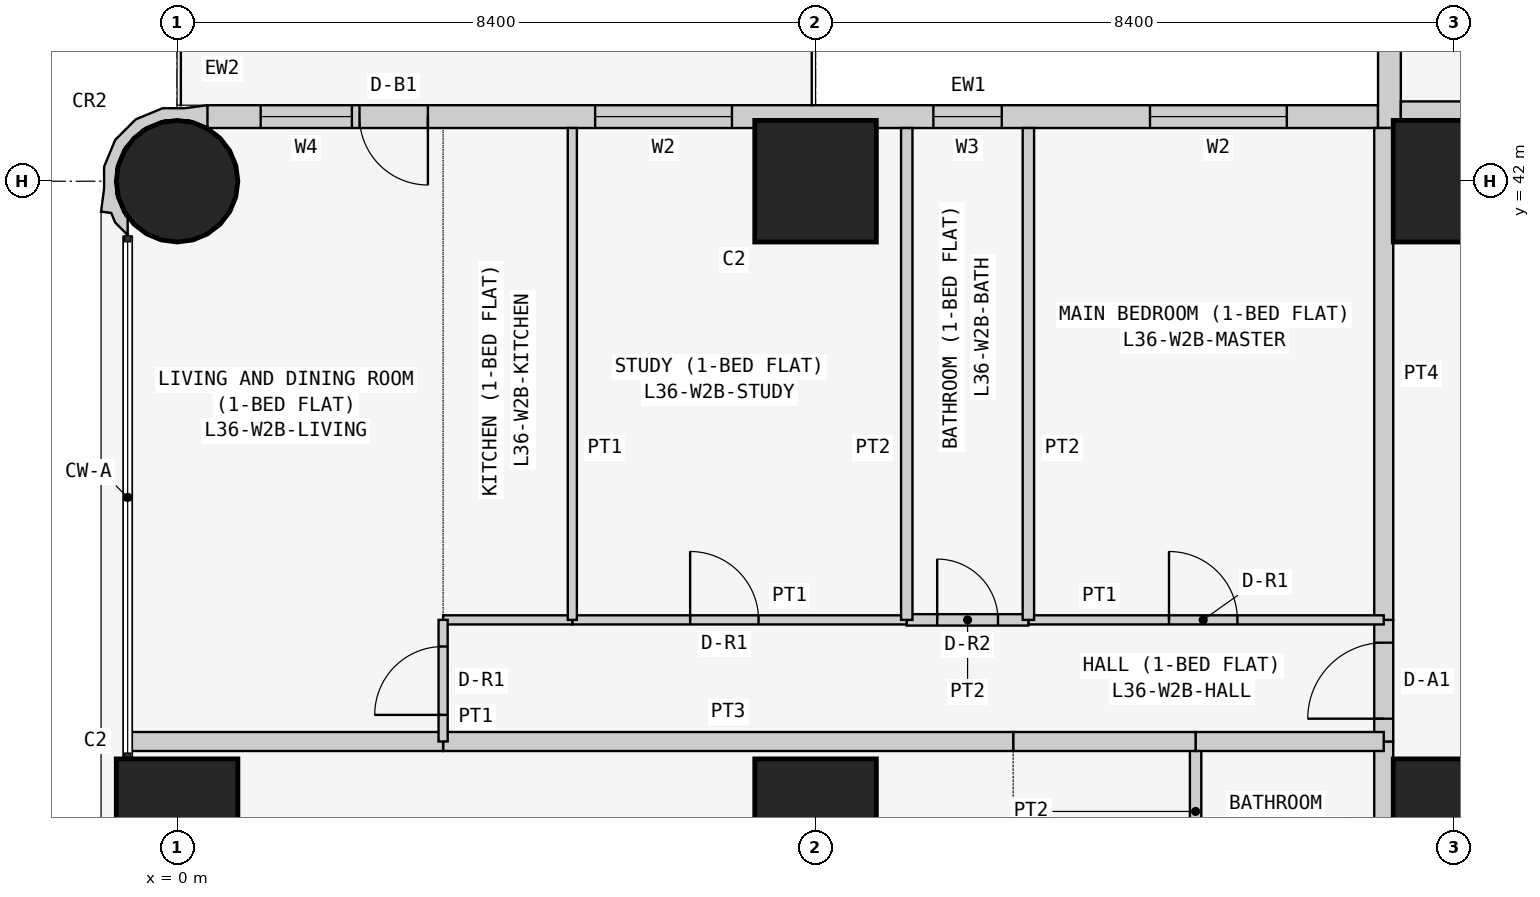
"""IFC4 building model, lengths in metres.
Left out: names, types, materials, properties, quantities, classifications, styles, units other than length and angle.
Written with IfcOpenShell. Run it as: python <this file> out.ifc"""

import sys

from ifc_helpers import new_model, si_unit, direction, frame, frame_2d, origin, origin_2d, place, context, subcontext, project, spatial, polyline, rectangle, circle, outline, extrude, element, fill, save


model = new_model("IFC4")
c1 = context("Model", 3, precision=1e-05, world=origin(), true_north=direction((0.0, 1.0)))
c2 = subcontext(c1, "Body", "Model", "MODEL_VIEW")
j1 = project(units=[si_unit("LENGTHUNIT", "METRE"), si_unit("PLANEANGLEUNIT", "RADIAN")], contexts=[c1])
p1 = place(None, origin())
s1 = spatial("IfcSite", under=j1, at=p1, CompositionType="ELEMENT")
p2 = place(p1, origin())
s2 = spatial("IfcBuilding", under=s1, at=p2, CompositionType="ELEMENT")
p3 = place(p2, frame((0.0, 0.0, 141.3)))
s3 = spatial("IfcBuildingStorey", under=s2, at=p3, CompositionType="ELEMENT", Elevation=141.3)
p4 = place(p3, frame((0.0, 33.6, 0.0), z_axis=(0.0, 0.0, 1.0), x_axis=(1.0, 0.0, 0.0)))
e1 = element("IfcColumn", 1, at=p4, inside=s3, PredefinedType="COLUMN", context=c2, shape_type="SweptSolid", body=[
    extrude(rectangle(XDim=1.6, YDim=1.6, at=origin_2d()), origin(), (0.0, 0.0, 1.0), 3.6),
])
p5 = place(p3, frame((0.0, 42.0, 0.0), z_axis=(0.0, 0.0, 1.0), x_axis=(1.0, 0.0, 0.0)))
e2 = element("IfcColumn", 2, at=p5, inside=s3, PredefinedType="COLUMN", context=c2, shape_type="SweptSolid", body=[
    extrude(circle(Radius=0.8, at=origin_2d()), origin(), (0.0, 0.0, 1.0), 3.6),
])
for number, where, z_axis, x_axis in (
    (3, (8.4, 33.6, 0.0), (0.0, 0.0, 1.0), (1.0, 0.0, 0.0)),
    (4, (8.4, 42.0, 0.0), (0.0, 0.0, 1.0), (1.0, 0.0, 0.0)),
    (5, (16.8, 33.6, 0.0), (0.0, 0.0, 1.0), (1.0, 0.0, 0.0)),
    (6, (16.8, 42.0, 0.0), (0.0, 0.0, 1.0), (1.0, 0.0, 0.0)),
):
    element("IfcColumn", number, at=place(p3, frame(where, z_axis=z_axis, x_axis=x_axis)), inside=s3, PredefinedType="COLUMN", context=c2, shape_type="SweptSolid", body=[
        extrude(rectangle(XDim=1.6, YDim=1.6, at=origin_2d()), origin(), (0.0, 0.0, 1.0), 3.6),
    ])
p6 = place(p3, frame((15.8, 42.85, 0.0), z_axis=(0.0, 0.0, 1.0), x_axis=(-1.0, 0.0, 0.0)))
e7 = element("IfcWall", 7, at=p6, inside=s3, PredefinedType="SOLIDWALL", context=c2, shape_type="SweptSolid", body=[
    extrude(rectangle(XDim=15.4, YDim=0.3, at=frame_2d((7.7, 0.0))), origin(), (0.0, 0.0, 1.0), 3.45),
])
p7 = place(p6, frame((1.2, 0.0, 0.9)))
e8 = element("IfcOpeningElement", 8, at=p7, cuts=e7, PredefinedType="OPENING", context=c2, shape_type="SweptSolid", body=[
    extrude(rectangle(XDim=1.8, YDim=1.5, at=frame_2d((0.9, 0.75))), frame((0.0, 0.16, 0.0), z_axis=(0.0, -1.0, 0.0), x_axis=(1.0, 0.0, 0.0)), (0.0, 0.0, 1.0), 0.32),
])
p8 = place(p6, frame((4.95, 0.0, 1.5)))
e9 = element("IfcOpeningElement", 9, at=p8, cuts=e7, PredefinedType="OPENING", context=c2, shape_type="SweptSolid", body=[
    extrude(rectangle(XDim=0.9, YDim=0.7, at=frame_2d((0.45, 0.35))), frame((0.0, 0.16, 0.0), z_axis=(0.0, -1.0, 0.0), x_axis=(1.0, 0.0, 0.0)), (0.0, 0.0, 1.0), 0.32),
])
p9 = place(p6, frame((8.5, 0.0, 0.9)))
e10 = element("IfcOpeningElement", 10, at=p9, cuts=e7, PredefinedType="OPENING", context=c2, shape_type="SweptSolid", body=[
    extrude(rectangle(XDim=1.8, YDim=1.5, at=frame_2d((0.9, 0.75))), frame((0.0, 0.16, 0.0), z_axis=(0.0, -1.0, 0.0), x_axis=(1.0, 0.0, 0.0)), (0.0, 0.0, 1.0), 0.32),
])
p10 = place(p6, frame((12.5, 0.0, 0.0)))
e11 = element("IfcOpeningElement", 11, at=p10, cuts=e7, PredefinedType="OPENING", context=c2, shape_type="SweptSolid", body=[
    extrude(rectangle(XDim=0.9, YDim=2.4, at=frame_2d((0.45, 1.2))), frame((0.0, 0.16, 0.0), z_axis=(0.0, -1.0, 0.0), x_axis=(1.0, 0.0, 0.0)), (0.0, 0.0, 1.0), 0.32),
])
p11 = place(p6, frame((13.5, 0.0, 0.9)))
e12 = element("IfcOpeningElement", 12, at=p11, cuts=e7, PredefinedType="OPENING", context=c2, shape_type="SweptSolid", body=[
    extrude(rectangle(XDim=1.2, YDim=1.5, at=frame_2d((0.6, 0.75))), frame((0.0, 0.16, 0.0), z_axis=(0.0, -1.0, 0.0), x_axis=(1.0, 0.0, 0.0)), (0.0, 0.0, 1.0), 0.32),
])
p12 = place(p3, frame((15.95, 50.0, 0.0), z_axis=(0.0, 0.0, 1.0), x_axis=(0.0, -1.0, 0.0)))
e13 = element("IfcWall", 13, at=p12, inside=s3, PredefinedType="SOLIDWALL", context=c2, shape_type="SweptSolid", body=[
    extrude(rectangle(XDim=7.3, YDim=0.3, at=frame_2d((3.65, 0.0))), origin(), (0.0, 0.0, 1.0), 3.45),
])
p13 = place(p12, frame((3.1, 0.0, 0.9)))
e14 = element("IfcOpeningElement", 14, at=p13, cuts=e13, PredefinedType="OPENING", context=c2, shape_type="SweptSolid", body=[
    extrude(rectangle(XDim=2.4, YDim=1.5, at=frame_2d((1.2, 0.75))), frame((0.0, 0.16, 0.0), z_axis=(0.0, -1.0, 0.0), x_axis=(1.0, 0.0, 0.0)), (0.0, 0.0, 1.0), 0.32),
])
p14 = place(p12, frame((0.75, 0.0, 0.9)))
e15 = element("IfcOpeningElement", 15, at=p14, cuts=e13, PredefinedType="OPENING", context=c2, shape_type="SweptSolid", body=[
    extrude(rectangle(XDim=1.2, YDim=1.5, at=frame_2d((0.6, 0.75))), frame((0.0, 0.16, 0.0), z_axis=(0.0, -1.0, 0.0), x_axis=(1.0, 0.0, 0.0)), (0.0, 0.0, 1.0), 0.32),
])
p15 = place(p3, frame((0.327, 42.817, 0.0), z_axis=(0.0, 0.0, 1.0), x_axis=(-0.93923434088, 0.343276641956, 0.0)))
e16 = element("IfcWall", 16, at=p15, inside=s3, PredefinedType="SOLIDWALL", context=c2, shape_type="SweptSolid", body=[
    extrude(outline(polyline([(-0.006, -0.197), (0.266, -0.055), (0.535, 0.044), (0.816, 0.302), (0.977, 0.648), (0.994, 1.03), (0.895, 1.299), (0.828, 1.598), (0.697, 1.569), (0.604, 1.67), (0.394, 1.767), (0.471, 1.556), (0.509, 1.539), (0.724, 1.304), (0.833, 1.005), (0.82, 0.687), (0.686, 0.397), (0.451, 0.182), (0.152, 0.073), (-0.116, 0.084), (-0.127, 0.078), (-0.146, 0.071), (-0.006, -0.197)])), origin(), (0.0, 0.0, 1.0), 3.45),
])
p16 = place(p3, frame((16.1, 42.925, 0.0), z_axis=(0.0, 0.0, 1.0), x_axis=(1.0, 0.0, 0.0)))
e17 = element("IfcWall", 17, at=p16, inside=s3, PredefinedType="PARTITIONING", context=c2, shape_type="SweptSolid", body=[
    extrude(rectangle(XDim=6.871, YDim=0.25, at=frame_2d((3.436, 0.0))), origin(), (0.0, 0.0, 1.0), 3.45),
])
p17 = place(p3, frame((15.875, 32.0, 0.0), z_axis=(0.0, 0.0, 1.0), x_axis=(0.0, 1.0, 0.0)))
e18 = element("IfcWall", 18, at=p17, inside=s3, PredefinedType="PARTITIONING", context=c2, shape_type="SweptSolid", body=[
    extrude(rectangle(XDim=2.629, YDim=0.25, at=frame_2d((1.314, 0.0))), origin(), (0.0, 0.0, 1.0), 3.45),
])
p18 = place(p3, frame((15.875, 34.629, 0.0), z_axis=(0.0, 0.0, 1.0), x_axis=(0.0, 1.0, 0.0)))
e19 = element("IfcWall", 19, at=p18, inside=s3, PredefinedType="PARTITIONING", context=c2, shape_type="SweptSolid", body=[
    extrude(rectangle(XDim=1.6, YDim=0.25, at=frame_2d((0.8, 0.0))), origin(), (0.0, 0.0, 1.0), 3.45),
])
p19 = place(p18, frame((0.3, 0.0, 0.0)))
e20 = element("IfcOpeningElement", 20, at=p19, cuts=e19, PredefinedType="OPENING", context=c2, shape_type="SweptSolid", body=[
    extrude(rectangle(XDim=1.0, YDim=2.1, at=frame_2d((0.5, 1.05))), frame((0.0, 0.135, 0.0), z_axis=(0.0, -1.0, 0.0), x_axis=(1.0, 0.0, 0.0)), (0.0, 0.0, 1.0), 0.27),
])
p20 = place(p3, frame((15.875, 36.229, 0.0), z_axis=(0.0, 0.0, 1.0), x_axis=(0.0, 1.0, 0.0)))
e21 = element("IfcWall", 21, at=p20, inside=s3, PredefinedType="PARTITIONING", context=c2, shape_type="SweptSolid", body=[
    extrude(rectangle(XDim=6.471, YDim=0.25, at=frame_2d((3.235, 0.0))), origin(), (0.0, 0.0, 1.0), 3.45),
])
p21 = place(p3, frame((13.4, 32.0, 0.0), z_axis=(0.0, 0.0, 1.0), x_axis=(0.0, 1.0, 0.0)))
e22 = element("IfcWall", 22, at=p21, inside=s3, PredefinedType="PARTITIONING", context=c2, shape_type="SweptSolid", body=[
    extrude(rectangle(XDim=2.629, YDim=0.15, at=frame_2d((1.314, 0.0))), origin(), (0.0, 0.0, 1.0), 3.45),
])
p22 = place(p3, frame((13.4, 34.629, 0.0), z_axis=(0.0, 0.0, 1.0), x_axis=(1.0, 0.0, 0.0)))
e23 = element("IfcWall", 23, at=p22, inside=s3, PredefinedType="PARTITIONING", context=c2, shape_type="SweptSolid", body=[
    extrude(rectangle(XDim=2.475, YDim=0.25, at=frame_2d((1.238, 0.0))), origin(), (0.0, 0.0, 1.0), 3.45),
])
p23 = place(p3, frame((11.0, 34.629, 0.0), z_axis=(0.0, 0.0, 1.0), x_axis=(1.0, 0.0, 0.0)))
e24 = element("IfcWall", 24, at=p23, inside=s3, PredefinedType="PARTITIONING", context=c2, shape_type="SweptSolid", body=[
    extrude(rectangle(XDim=2.4, YDim=0.25, at=frame_2d((1.2, 0.0))), origin(), (0.0, 0.0, 1.0), 3.45),
])
p24 = place(p3, frame((3.5, 34.629, 0.0), z_axis=(0.0, 0.0, 1.0), x_axis=(1.0, 0.0, 0.0)))
e25 = element("IfcWall", 25, at=p24, inside=s3, PredefinedType="PARTITIONING", context=c2, shape_type="SweptSolid", body=[
    extrude(rectangle(XDim=7.5, YDim=0.25, at=frame_2d((3.75, 0.0))), origin(), (0.0, 0.0, 1.0), 3.45),
])
p25 = place(p3, frame((-0.65, 34.629, 0.0), z_axis=(0.0, 0.0, 1.0), x_axis=(1.0, 0.0, 0.0)))
e26 = element("IfcWall", 26, at=p25, inside=s3, PredefinedType="PARTITIONING", context=c2, shape_type="SweptSolid", body=[
    extrude(rectangle(XDim=4.15, YDim=0.25, at=frame_2d((2.075, 0.0))), origin(), (0.0, 0.0, 1.0), 3.45),
])
p26 = place(p3, frame((11.2, 36.229, 0.0), z_axis=(0.0, 0.0, 1.0), x_axis=(1.0, 0.0, 0.0)))
e27 = element("IfcWall", 27, at=p26, inside=s3, PredefinedType="PARTITIONING", context=c2, shape_type="SweptSolid", body=[
    extrude(rectangle(XDim=4.675, YDim=0.12, at=frame_2d((2.337, 0.0))), origin(), (0.0, 0.0, 1.0), 3.45),
])
p27 = place(p26, frame((1.85, 0.0, 0.0)))
e28 = element("IfcOpeningElement", 28, at=p27, cuts=e27, PredefinedType="OPENING", context=c2, shape_type="SweptSolid", body=[
    extrude(rectangle(XDim=0.9, YDim=2.1, at=frame_2d((0.45, 1.05))), frame((0.0, 0.07, 0.0), z_axis=(0.0, -1.0, 0.0), x_axis=(1.0, 0.0, 0.0)), (0.0, 0.0, 1.0), 0.14),
])
p28 = place(p3, frame((9.6, 36.229, 0.0), z_axis=(0.0, 0.0, 1.0), x_axis=(1.0, 0.0, 0.0)))
e29 = element("IfcWall", 29, at=p28, inside=s3, PredefinedType="PARTITIONING", context=c2, shape_type="SweptSolid", body=[
    extrude(rectangle(XDim=1.6, YDim=0.15, at=frame_2d((0.8, 0.0))), origin(), (0.0, 0.0, 1.0), 3.45),
])
p29 = place(p28, frame((0.4, 0.0, 0.0)))
e30 = element("IfcOpeningElement", 30, at=p29, cuts=e29, PredefinedType="OPENING", context=c2, shape_type="SweptSolid", body=[
    extrude(rectangle(XDim=0.8, YDim=2.1, at=frame_2d((0.4, 1.05))), frame((0.0, 0.085, 0.0), z_axis=(0.0, -1.0, 0.0), x_axis=(1.0, 0.0, 0.0)), (0.0, 0.0, 1.0), 0.17),
])
p30 = place(p3, frame((5.2, 36.229, 0.0), z_axis=(0.0, 0.0, 1.0), x_axis=(1.0, 0.0, 0.0)))
e31 = element("IfcWall", 31, at=p30, inside=s3, PredefinedType="PARTITIONING", context=c2, shape_type="SweptSolid", body=[
    extrude(rectangle(XDim=4.4, YDim=0.12, at=frame_2d((2.2, 0.0))), origin(), (0.0, 0.0, 1.0), 3.45),
])
p31 = place(p30, frame((1.55, 0.0, 0.0)))
e32 = element("IfcOpeningElement", 32, at=p31, cuts=e31, PredefinedType="OPENING", context=c2, shape_type="SweptSolid", body=[
    extrude(rectangle(XDim=0.9, YDim=2.1, at=frame_2d((0.45, 1.05))), frame((0.0, 0.07, 0.0), z_axis=(0.0, -1.0, 0.0), x_axis=(1.0, 0.0, 0.0)), (0.0, 0.0, 1.0), 0.14),
])
p32 = place(p3, frame((3.5, 36.229, 0.0), z_axis=(0.0, 0.0, 1.0), x_axis=(1.0, 0.0, 0.0)))
e33 = element("IfcWall", 33, at=p32, inside=s3, PredefinedType="PARTITIONING", context=c2, shape_type="SweptSolid", body=[
    extrude(rectangle(XDim=1.7, YDim=0.12, at=frame_2d((0.85, 0.0))), origin(), (0.0, 0.0, 1.0), 3.45),
])
p33 = place(p3, frame((3.5, 34.629, 0.0), z_axis=(0.0, 0.0, 1.0), x_axis=(0.0, 1.0, 0.0)))
e34 = element("IfcWall", 34, at=p33, inside=s3, PredefinedType="PARTITIONING", context=c2, shape_type="SweptSolid", body=[
    extrude(rectangle(XDim=1.6, YDim=0.12, at=frame_2d((0.8, 0.0))), origin(), (0.0, 0.0, 1.0), 3.45),
])
p34 = place(p33, frame((0.35, 0.0, 0.0)))
e35 = element("IfcOpeningElement", 35, at=p34, cuts=e34, PredefinedType="OPENING", context=c2, shape_type="SweptSolid", body=[
    extrude(rectangle(XDim=0.9, YDim=2.1, at=frame_2d((0.45, 1.05))), frame((0.0, 0.07, 0.0), z_axis=(0.0, -1.0, 0.0), x_axis=(1.0, 0.0, 0.0)), (0.0, 0.0, 1.0), 0.14),
])
for number, where, z_axis, x_axis in (
    (36, (11.2, 36.229, 0.0), (0.0, 0.0, 1.0), (0.0, 1.0, 0.0)),
    (37, (9.6, 36.229, 0.0), (0.0, 0.0, 1.0), (0.0, 1.0, 0.0)),
):
    element("IfcWall", number, at=place(p3, frame(where, z_axis=z_axis, x_axis=x_axis)), inside=s3, PredefinedType="PARTITIONING", context=c2, shape_type="SweptSolid", body=[
        extrude(rectangle(XDim=6.471, YDim=0.15, at=frame_2d((3.235, 0.0))), origin(), (0.0, 0.0, 1.0), 3.45),
    ])
p35 = place(p3, frame((5.2, 36.229, 0.0), z_axis=(0.0, 0.0, 1.0), x_axis=(0.0, 1.0, 0.0)))
e38 = element("IfcWall", 38, at=p35, inside=s3, PredefinedType="PARTITIONING", context=c2, shape_type="SweptSolid", body=[
    extrude(rectangle(XDim=6.471, YDim=0.12, at=frame_2d((3.235, 0.0))), origin(), (0.0, 0.0, 1.0), 3.45),
])
p36 = place(p7, origin())
e39 = element("IfcWindow", 39, at=p36, inside=s3, PartitioningType="SINGLE_PANEL", PredefinedType="WINDOW", context=c2, shape_type="SweptSolid", body=[
    extrude(rectangle(XDim=1.8, YDim=1.5, at=frame_2d((0.9, 0.75))), frame((0.0, 0.03, 0.0), z_axis=(0.0, -1.0, 0.0), x_axis=(1.0, 0.0, 0.0)), (0.0, 0.0, 1.0), 0.06),
])
fill(e8, e39)
p37 = place(p8, origin())
e40 = element("IfcWindow", 40, at=p37, inside=s3, PartitioningType="SINGLE_PANEL", PredefinedType="WINDOW", context=c2, shape_type="SweptSolid", body=[
    extrude(rectangle(XDim=0.9, YDim=0.7, at=frame_2d((0.45, 0.35))), frame((0.0, 0.03, 0.0), z_axis=(0.0, -1.0, 0.0), x_axis=(1.0, 0.0, 0.0)), (0.0, 0.0, 1.0), 0.06),
])
fill(e9, e40)
p38 = place(p9, origin())
e41 = element("IfcWindow", 41, at=p38, inside=s3, PartitioningType="SINGLE_PANEL", PredefinedType="WINDOW", context=c2, shape_type="SweptSolid", body=[
    extrude(rectangle(XDim=1.8, YDim=1.5, at=frame_2d((0.9, 0.75))), frame((0.0, 0.03, 0.0), z_axis=(0.0, -1.0, 0.0), x_axis=(1.0, 0.0, 0.0)), (0.0, 0.0, 1.0), 0.06),
])
fill(e10, e41)
p39 = place(p10, origin())
e42 = element("IfcDoor", 42, at=p39, inside=s3, OperationType="SINGLE_SWING_LEFT", PredefinedType="DOOR", context=c2, shape_type="SweptSolid", body=[
    extrude(rectangle(XDim=0.9, YDim=2.4, at=frame_2d((0.45, 1.2))), frame((0.0, 0.025, 0.0), z_axis=(0.0, -1.0, 0.0), x_axis=(1.0, 0.0, 0.0)), (0.0, 0.0, 1.0), 0.05),
])
fill(e11, e42)
p40 = place(p11, origin())
e43 = element("IfcWindow", 43, at=p40, inside=s3, PartitioningType="SINGLE_PANEL", PredefinedType="WINDOW", context=c2, shape_type="SweptSolid", body=[
    extrude(rectangle(XDim=1.2, YDim=1.5, at=frame_2d((0.6, 0.75))), frame((0.0, 0.03, 0.0), z_axis=(0.0, -1.0, 0.0), x_axis=(1.0, 0.0, 0.0)), (0.0, 0.0, 1.0), 0.06),
])
fill(e12, e43)
p41 = place(p19, origin())
e44 = element("IfcDoor", 44, at=p41, inside=s3, OperationType="SINGLE_SWING_LEFT", PredefinedType="DOOR", context=c2, shape_type="SweptSolid", body=[
    extrude(rectangle(XDim=1.0, YDim=2.1, at=frame_2d((0.5, 1.05))), frame((0.0, 0.025, 0.0), z_axis=(0.0, -1.0, 0.0), x_axis=(1.0, 0.0, 0.0)), (0.0, 0.0, 1.0), 0.05),
])
fill(e20, e44)
p42 = place(p27, origin())
e45 = element("IfcDoor", 45, at=p42, inside=s3, OperationType="SINGLE_SWING_LEFT", PredefinedType="DOOR", context=c2, shape_type="SweptSolid", body=[
    extrude(rectangle(XDim=0.9, YDim=2.1, at=frame_2d((0.45, 1.05))), frame((0.0, 0.025, 0.0), z_axis=(0.0, -1.0, 0.0), x_axis=(1.0, 0.0, 0.0)), (0.0, 0.0, 1.0), 0.05),
])
fill(e28, e45)
p43 = place(p29, origin())
e46 = element("IfcDoor", 46, at=p43, inside=s3, OperationType="SINGLE_SWING_LEFT", PredefinedType="DOOR", context=c2, shape_type="SweptSolid", body=[
    extrude(rectangle(XDim=0.8, YDim=2.1, at=frame_2d((0.4, 1.05))), frame((0.0, 0.025, 0.0), z_axis=(0.0, -1.0, 0.0), x_axis=(1.0, 0.0, 0.0)), (0.0, 0.0, 1.0), 0.05),
])
fill(e30, e46)
p44 = place(p31, origin())
e47 = element("IfcDoor", 47, at=p44, inside=s3, OperationType="SINGLE_SWING_LEFT", PredefinedType="DOOR", context=c2, shape_type="SweptSolid", body=[
    extrude(rectangle(XDim=0.9, YDim=2.1, at=frame_2d((0.45, 1.05))), frame((0.0, 0.025, 0.0), z_axis=(0.0, -1.0, 0.0), x_axis=(1.0, 0.0, 0.0)), (0.0, 0.0, 1.0), 0.05),
])
fill(e32, e47)
p45 = place(p34, origin())
e48 = element("IfcDoor", 48, at=p45, inside=s3, OperationType="SINGLE_SWING_LEFT", PredefinedType="DOOR", context=c2, shape_type="SweptSolid", body=[
    extrude(rectangle(XDim=0.9, YDim=2.1, at=frame_2d((0.45, 1.05))), frame((0.0, 0.025, 0.0), z_axis=(0.0, -1.0, 0.0), x_axis=(1.0, 0.0, 0.0)), (0.0, 0.0, 1.0), 0.05),
])
fill(e35, e48)
save(model, sys.argv[1])
